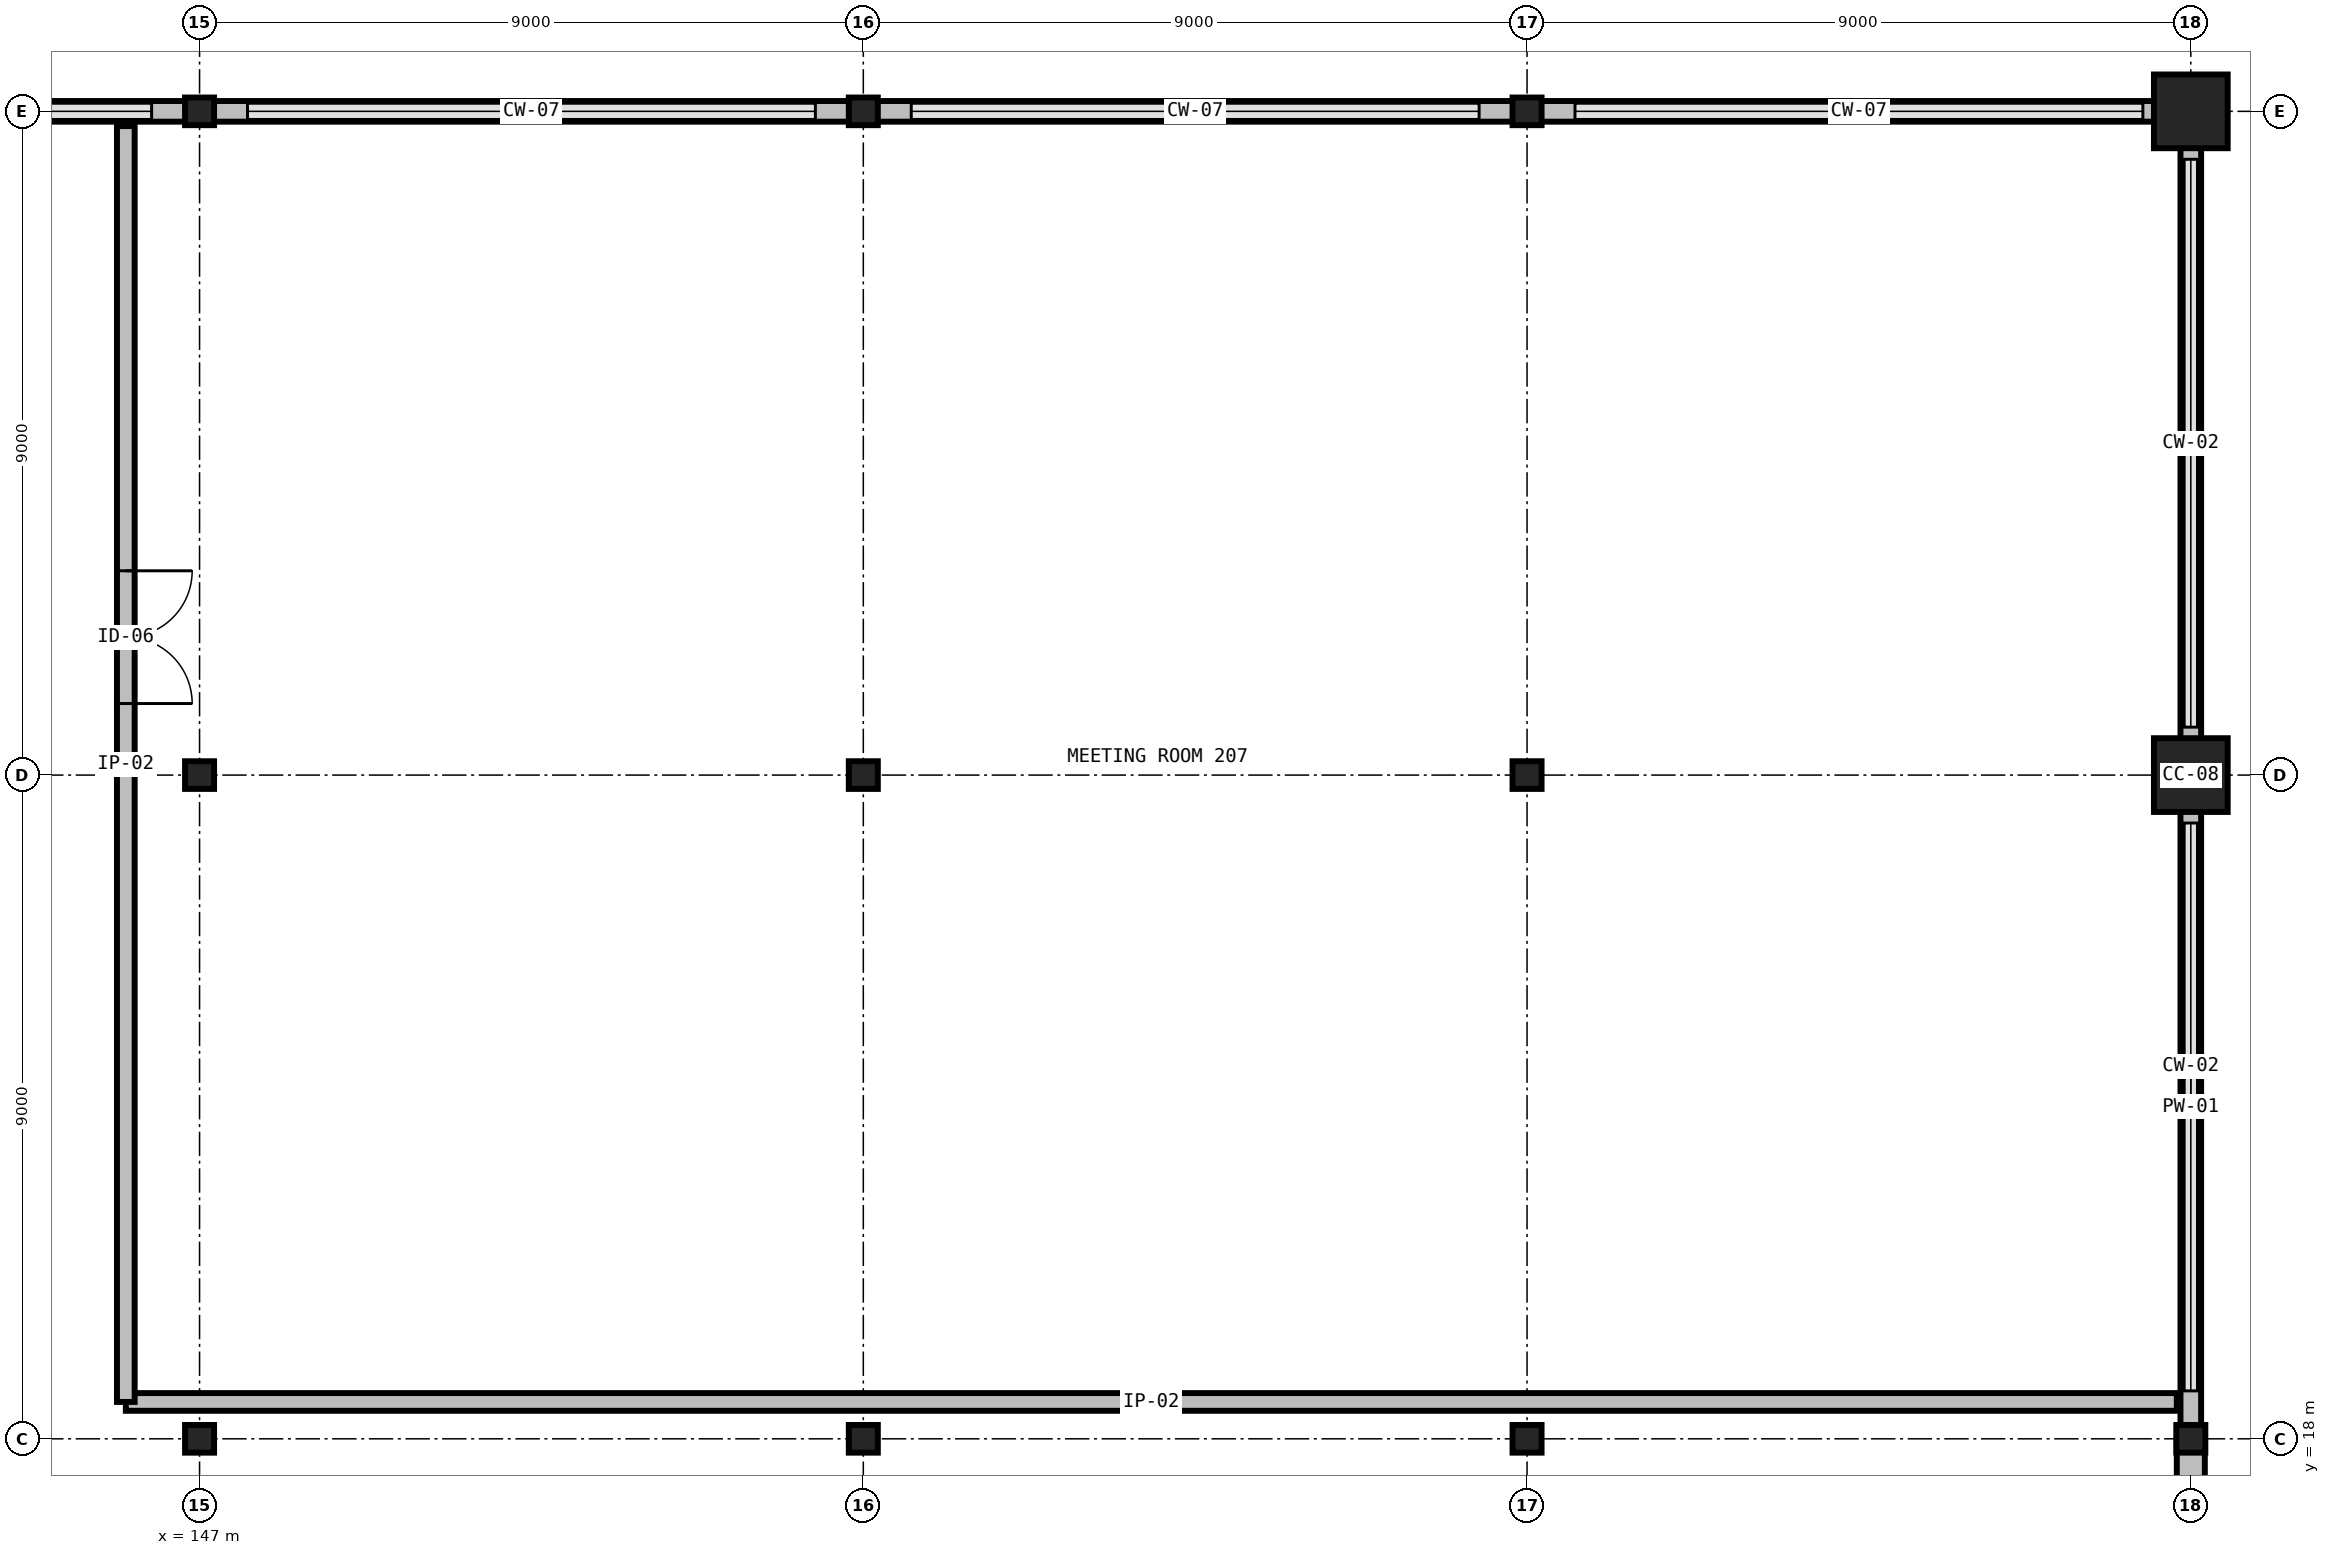
"""IFC4 building model, lengths in metres.
Left out: names, types, materials, properties, quantities, classifications, styles, units other than length and angle.
Written with IfcOpenShell. Run it as: python <this file> out.ifc"""

import sys

from ifc_helpers import new_model, si_unit, direction, frame, frame_2d, origin, origin_2d, place, context, subcontext, project, spatial, rectangle, circle, i_section, extrude, element, fill, save


model = new_model("IFC4")
c1 = context("Model", 3, precision=1e-05, world=origin(), true_north=direction((0.0, 1.0)))
c2 = subcontext(c1, "Body", "Model", "MODEL_VIEW")
j1 = project(units=[si_unit("LENGTHUNIT", "METRE"), si_unit("PLANEANGLEUNIT", "RADIAN")], contexts=[c1])
p1 = place(None, origin())
s1 = spatial("IfcSite", under=j1, at=p1, CompositionType="ELEMENT")
p2 = place(p1, origin())
s2 = spatial("IfcBuilding", under=s1, at=p2, CompositionType="ELEMENT")
p3 = place(p2, frame((0.0, 0.0, 12.0)))
s3 = spatial("IfcBuildingStorey", under=s2, at=p3, CompositionType="ELEMENT", Elevation=12.0)
for number, where, z_axis, x_axis in (
    (1, (147.0, 18.0, 0.0), (0.0, 0.0, 1.0), (1.0, 0.0, 0.0)),
    (2, (147.0, 27.0, 0.0), (0.0, 0.0, 1.0), (1.0, 0.0, 0.0)),
    (3, (147.0, 36.0, 0.0), (0.0, 0.0, 1.0), (1.0, 0.0, 0.0)),
    (4, (156.0, 18.0, 0.0), (0.0, 0.0, 1.0), (1.0, 0.0, 0.0)),
    (5, (156.0, 27.0, 0.0), (0.0, 0.0, 1.0), (1.0, 0.0, 0.0)),
    (6, (156.0, 36.0, 0.0), (0.0, 0.0, 1.0), (1.0, 0.0, 0.0)),
    (7, (165.0, 18.0, 0.0), (0.0, 0.0, 1.0), (1.0, 0.0, 0.0)),
    (8, (165.0, 27.0, 0.0), (0.0, 0.0, 1.0), (1.0, 0.0, 0.0)),
    (9, (165.0, 36.0, 0.0), (0.0, 0.0, 1.0), (1.0, 0.0, 0.0)),
    (10, (174.0, 18.0, 0.0), (0.0, 0.0, 1.0), (1.0, 0.0, 0.0)),
):
    element("IfcColumn", number, at=place(p3, frame(where, z_axis=z_axis, x_axis=x_axis)), inside=s3, PredefinedType="COLUMN", context=c2, shape_type="SweptSolid", body=[
        extrude(i_section(OverallWidth=0.394, OverallDepth=0.375, WebThickness=0.017, FlangeThickness=0.028, FilletRadius=0.031, at=origin_2d()), origin(), (0.0, 0.0, 1.0), 6.0),
    ])
for number, where, z_axis, x_axis in (
    (11, (174.0, 27.0, 0.0), (0.0, 0.0, 1.0), (1.0, 0.0, 0.0)),
    (12, (174.0, 36.0, 0.0), (0.0, 0.0, 1.0), (1.0, 0.0, 0.0)),
):
    element("IfcColumn", number, at=place(p3, frame(where, z_axis=z_axis, x_axis=x_axis)), inside=s3, PredefinedType="COLUMN", context=c2, shape_type="SweptSolid", body=[
        extrude(circle(Radius=0.5, at=origin_2d()), origin(), (0.0, 0.0, 1.0), 6.0),
    ])
p4 = place(p3, frame((174.0, 9.0, 0.0), z_axis=(0.0, 0.0, 1.0), x_axis=(0.0, 1.0, 0.0)))
e13 = element("IfcWall", 13, at=p4, inside=s3, PredefinedType="STANDARD", context=c2, shape_type="SweptSolid", body=[
    extrude(rectangle(XDim=9.0, YDim=0.38, at=frame_2d((4.5, 0.0))), origin(), (0.0, 0.0, 1.0), 5.239),
])
for number, where, z_axis, x_axis in (
    (14, (174.0, 18.0, 0.0), (0.0, 0.0, 1.0), (0.0, 1.0, 0.0)),
    (15, (174.0, 27.0, 0.0), (0.0, 0.0, 1.0), (0.0, 1.0, 0.0)),
    (16, (147.0, 36.0, 0.0), (0.0, 0.0, 1.0), (-1.0, 0.0, 0.0)),
    (17, (156.0, 36.0, 0.0), (0.0, 0.0, 1.0), (-1.0, 0.0, 0.0)),
    (18, (165.0, 36.0, 0.0), (0.0, 0.0, 1.0), (-1.0, 0.0, 0.0)),
    (19, (174.0, 36.0, 0.0), (0.0, 0.0, 1.0), (-1.0, 0.0, 0.0)),
):
    element("IfcWall", number, at=place(p3, frame(where, z_axis=z_axis, x_axis=x_axis)), inside=s3, PredefinedType="PARAPET", context=c2, shape_type="SweptSolid", body=[
        extrude(rectangle(XDim=9.0, YDim=0.28, at=frame_2d((4.5, 0.0))), origin(), (0.0, 0.0, 1.0), 0.2),
    ])
p5 = place(p3, frame((146.0, 18.5, 0.0), z_axis=(0.0, 0.0, 1.0), x_axis=(1.0, 0.0, 0.0)))
e20 = element("IfcWall", 20, at=p5, inside=s3, PredefinedType="PARTITIONING", context=c2, shape_type="SweptSolid", body=[
    extrude(rectangle(XDim=27.81, YDim=0.24, at=frame_2d((13.905, 0.0))), origin(), (0.0, 0.0, 1.0), 5.65),
])
p6 = place(p3, frame((146.0, 35.8, 0.0), z_axis=(0.0, 0.0, 1.0), x_axis=(0.0, -1.0, 0.0)))
e21 = element("IfcWall", 21, at=p6, inside=s3, PredefinedType="PARTITIONING", context=c2, shape_type="SweptSolid", body=[
    extrude(rectangle(XDim=17.3, YDim=0.24, at=frame_2d((8.65, 0.0))), origin(), (0.0, 0.0, 1.0), 5.65),
])
p7 = place(p6, frame((6.03, 0.0, 0.0)))
e22 = element("IfcOpeningElement", 22, at=p7, cuts=e21, PredefinedType="OPENING", context=c2, shape_type="SweptSolid", body=[
    extrude(rectangle(XDim=1.8, YDim=2.3, at=frame_2d((0.9, 1.15))), frame((0.0, 0.135, 0.0), z_axis=(0.0, -1.0, 0.0), x_axis=(1.0, 0.0, 0.0)), (0.0, 0.0, 1.0), 0.27),
])
p8 = place(p7, origin())
e23 = element("IfcDoor", 23, at=p8, inside=s3, OperationType="DOUBLE_DOOR_SINGLE_SWING", PredefinedType="DOOR", context=c2, shape_type="SweptSolid", body=[
    extrude(rectangle(XDim=1.8, YDim=2.3, at=frame_2d((0.9, 1.15))), frame((0.0, 0.025, 0.0), z_axis=(0.0, -1.0, 0.0), x_axis=(1.0, 0.0, 0.0)), (0.0, 0.0, 1.0), 0.05),
])
fill(e22, e23)
save(model, sys.argv[1])
